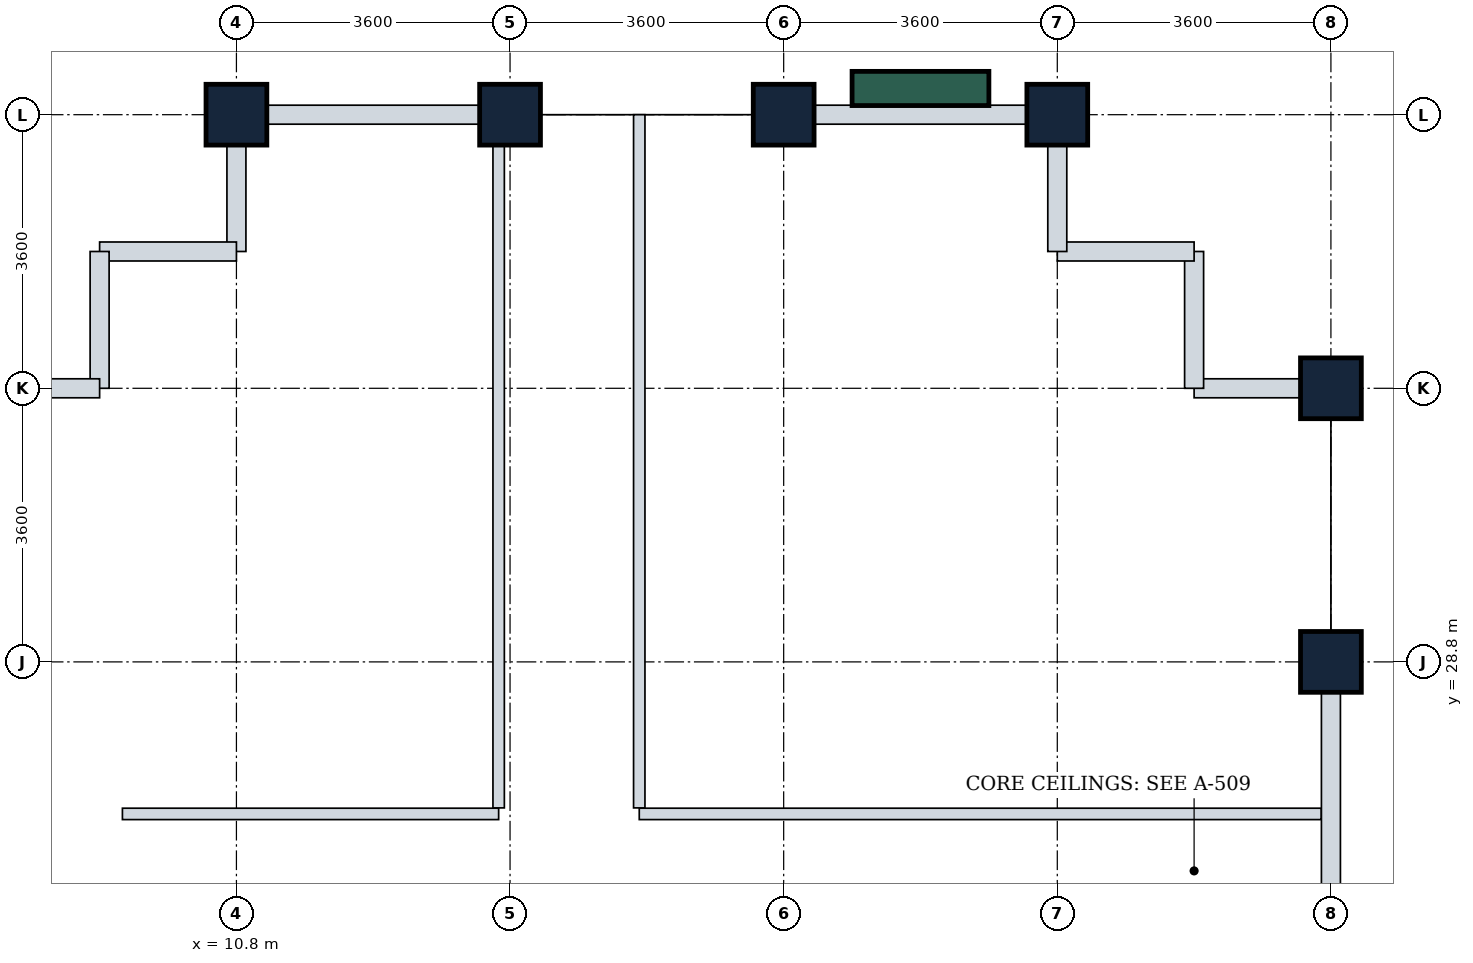
"""IFC4 building model, lengths in metres.
Left out: names, types, materials, properties, quantities, classifications, styles, units other than length and angle.
Written with IfcOpenShell. Run it as: python <this file> out.ifc"""

import sys

from ifc_helpers import new_model, si_unit, direction, frame, frame_2d, origin, origin_2d, place, context, subcontext, project, spatial, rectangle, extrude, element, fill, save


model = new_model("IFC4")
c1 = context("Model", 3, precision=1e-05, world=origin(), true_north=direction((0.0, 1.0)))
c2 = subcontext(c1, "Body", "Model", "MODEL_VIEW")
j1 = project(units=[si_unit("LENGTHUNIT", "METRE"), si_unit("PLANEANGLEUNIT", "RADIAN")], contexts=[c1])
p1 = place(None, origin())
s1 = spatial("IfcSite", under=j1, at=p1, CompositionType="ELEMENT")
p2 = place(p1, origin())
s2 = spatial("IfcBuilding", under=s1, at=p2, CompositionType="ELEMENT")
p3 = place(p2, frame((0.0, 0.0, 295.4)))
s3 = spatial("IfcBuildingStorey", under=s2, at=p3, CompositionType="ELEMENT", Elevation=295.4)
for number, where, z_axis, x_axis in (
    (1, (10.8, 36.0, 0.0), (0.0, 0.0, 1.0), (1.0, 0.0, 0.0)),
    (2, (14.4, 36.0, 0.0), (0.0, 0.0, 1.0), (1.0, 0.0, 0.0)),
    (3, (18.0, 36.0, 0.0), (0.0, 0.0, 1.0), (1.0, 0.0, 0.0)),
    (4, (21.6, 36.0, 0.0), (0.0, 0.0, 1.0), (1.0, 0.0, 0.0)),
    (5, (25.2, 28.8, 0.0), (0.0, 0.0, 1.0), (0.0, 1.0, 0.0)),
    (6, (25.2, 32.4, 0.0), (0.0, 0.0, 1.0), (0.0, 1.0, 0.0)),
):
    element("IfcColumn", number, at=place(p3, frame(where, z_axis=z_axis, x_axis=x_axis)), inside=s3, PredefinedType="COLUMN", context=c2, shape_type="SweptSolid", body=[
        extrude(rectangle(XDim=0.8, YDim=0.8, at=origin_2d()), origin(), (0.0, 0.0, 1.0), 4.4),
    ])
p4 = place(p3, frame((25.2, 28.8, 0.0), z_axis=(0.0, 0.0, 1.0), x_axis=(0.0, -1.0, 0.0)))
e7 = element("IfcWall", 7, at=p4, inside=s3, PredefinedType="STANDARD", context=c2, shape_type="SweptSolid", body=[
    extrude(rectangle(XDim=3.6, YDim=0.25, at=frame_2d((1.8, 0.0))), origin(), (0.0, 0.0, 1.0), 3.63),
])
p5 = place(p3, frame((23.4, 32.4, 0.0), z_axis=(0.0, 0.0, 1.0), x_axis=(1.0, 0.0, 0.0)))
e8 = element("IfcWall", 8, at=p5, inside=s3, PredefinedType="STANDARD", context=c2, shape_type="SweptSolid", body=[
    extrude(rectangle(XDim=1.8, YDim=0.25, at=frame_2d((0.9, 0.0))), origin(), (0.0, 0.0, 1.0), 3.63),
])
p6 = place(p3, frame((23.4, 32.4, 0.0), z_axis=(0.0, 0.0, 1.0), x_axis=(0.0, 1.0, 0.0)))
e9 = element("IfcWall", 9, at=p6, inside=s3, PredefinedType="STANDARD", context=c2, shape_type="SweptSolid", body=[
    extrude(rectangle(XDim=1.8, YDim=0.25, at=frame_2d((0.9, 0.0))), origin(), (0.0, 0.0, 1.0), 4.135),
])
p7 = place(p3, frame((21.6, 34.2, 0.0), z_axis=(0.0, 0.0, 1.0), x_axis=(1.0, 0.0, 0.0)))
e10 = element("IfcWall", 10, at=p7, inside=s3, PredefinedType="STANDARD", context=c2, shape_type="SweptSolid", body=[
    extrude(rectangle(XDim=1.8, YDim=0.25, at=frame_2d((0.9, 0.0))), origin(), (0.0, 0.0, 1.0), 4.135),
])
p8 = place(p3, frame((21.6, 34.2, 0.0), z_axis=(0.0, 0.0, 1.0), x_axis=(0.0, 1.0, 0.0)))
e11 = element("IfcWall", 11, at=p8, inside=s3, PredefinedType="STANDARD", context=c2, shape_type="SweptSolid", body=[
    extrude(rectangle(XDim=1.8, YDim=0.25, at=frame_2d((0.9, 0.0))), origin(), (0.0, 0.0, 1.0), 3.63),
])
p9 = place(p3, frame((18.0, 36.0, 0.0), z_axis=(0.0, 0.0, 1.0), x_axis=(1.0, 0.0, 0.0)))
e12 = element("IfcWall", 12, at=p9, inside=s3, PredefinedType="STANDARD", context=c2, shape_type="SweptSolid", body=[
    extrude(rectangle(XDim=3.6, YDim=0.25, at=frame_2d((1.8, 0.0))), origin(), (0.0, 0.0, 1.0), 3.63),
])
p10 = place(p9, frame((0.9, 0.0, 0.85)))
e13 = element("IfcOpeningElement", 13, at=p10, cuts=e12, PredefinedType="OPENING", context=c2, shape_type="SweptSolid", body=[
    extrude(rectangle(XDim=1.8, YDim=1.35, at=frame_2d((0.9, 0.675))), frame((0.0, 0.135, 0.0), z_axis=(0.0, -1.0, 0.0), x_axis=(1.0, 0.0, 0.0)), (0.0, 0.0, 1.0), 0.27),
])
p11 = place(p3, frame((10.8, 36.0, 0.0), z_axis=(0.0, 0.0, 1.0), x_axis=(1.0, 0.0, 0.0)))
e14 = element("IfcWall", 14, at=p11, inside=s3, PredefinedType="STANDARD", context=c2, shape_type="SweptSolid", body=[
    extrude(rectangle(XDim=3.6, YDim=0.25, at=frame_2d((1.8, 0.0))), origin(), (0.0, 0.0, 1.0), 3.63),
])
p12 = place(p3, frame((10.8, 34.2, 0.0), z_axis=(0.0, 0.0, 1.0), x_axis=(0.0, 1.0, 0.0)))
e15 = element("IfcWall", 15, at=p12, inside=s3, PredefinedType="STANDARD", context=c2, shape_type="SweptSolid", body=[
    extrude(rectangle(XDim=1.8, YDim=0.25, at=frame_2d((0.9, 0.0))), origin(), (0.0, 0.0, 1.0), 3.63),
])
for number, where, z_axis, x_axis in (
    (16, (9.0, 34.2, 0.0), (0.0, 0.0, 1.0), (1.0, 0.0, 0.0)),
    (17, (9.0, 32.4, 0.0), (0.0, 0.0, 1.0), (0.0, 1.0, 0.0)),
):
    element("IfcWall", number, at=place(p3, frame(where, z_axis=z_axis, x_axis=x_axis)), inside=s3, PredefinedType="STANDARD", context=c2, shape_type="SweptSolid", body=[
        extrude(rectangle(XDim=1.8, YDim=0.25, at=frame_2d((0.9, 0.0))), origin(), (0.0, 0.0, 1.0), 4.135),
    ])
p13 = place(p3, frame((7.2, 32.4, 0.0), z_axis=(0.0, 0.0, 1.0), x_axis=(1.0, 0.0, 0.0)))
e18 = element("IfcWall", 18, at=p13, inside=s3, PredefinedType="STANDARD", context=c2, shape_type="SweptSolid", body=[
    extrude(rectangle(XDim=1.8, YDim=0.25, at=frame_2d((0.9, 0.0))), origin(), (0.0, 0.0, 1.0), 3.63),
])
p14 = place(p3, frame((9.3, 26.8, 0.0), z_axis=(0.0, 0.0, 1.0), x_axis=(1.0, 0.0, 0.0)))
e19 = element("IfcWall", 19, at=p14, inside=s3, PredefinedType="PARTITIONING", context=c2, shape_type="SweptSolid", body=[
    extrude(rectangle(XDim=4.95, YDim=0.15, at=frame_2d((2.475, 0.0))), origin(), (0.0, 0.0, 1.0), 4.135),
])
p15 = place(p3, frame((14.25, 26.879, 0.0), z_axis=(0.0, 0.0, 1.0), x_axis=(0.0, 1.0, 0.0)))
e20 = element("IfcWall", 20, at=p15, inside=s3, PredefinedType="PARTITIONING", context=c2, shape_type="SweptSolid", body=[
    extrude(rectangle(XDim=8.992, YDim=0.15, at=frame_2d((4.496, 0.0))), origin(), (0.0, 0.0, 1.0), 3.63),
])
p16 = place(p15, frame((4.021, 0.0, 0.0)))
e21 = element("IfcOpeningElement", 21, at=p16, cuts=e20, PredefinedType="OPENING", context=c2, shape_type="SweptSolid", body=[
    extrude(rectangle(XDim=1.0, YDim=2.1, at=frame_2d((0.5, 1.05))), frame((0.0, 0.085, 0.0), z_axis=(0.0, -1.0, 0.0), x_axis=(1.0, 0.0, 0.0)), (0.0, 0.0, 1.0), 0.17),
])
p17 = place(p3, frame((16.1, 26.8, 0.0), z_axis=(0.0, 0.0, 1.0), x_axis=(1.0, 0.0, 0.0)))
e22 = element("IfcWall", 22, at=p17, inside=s3, PredefinedType="PARTITIONING", context=c2, shape_type="SweptSolid", body=[
    extrude(rectangle(XDim=8.971, YDim=0.15, at=frame_2d((4.485, 0.0))), origin(), (0.0, 0.0, 1.0), 3.63),
])
p18 = place(p3, frame((16.1, 26.879, 0.0), z_axis=(0.0, 0.0, 1.0), x_axis=(0.0, 1.0, 0.0)))
e23 = element("IfcWall", 23, at=p18, inside=s3, PredefinedType="PARTITIONING", context=c2, shape_type="SweptSolid", body=[
    extrude(rectangle(XDim=9.121, YDim=0.15, at=frame_2d((4.561, 0.0))), origin(), (0.0, 0.0, 1.0), 3.63),
])
p19 = place(p18, frame((4.021, 0.0, 0.0)))
e24 = element("IfcOpeningElement", 24, at=p19, cuts=e23, PredefinedType="OPENING", context=c2, shape_type="SweptSolid", body=[
    extrude(rectangle(XDim=1.0, YDim=2.1, at=frame_2d((0.5, 1.05))), frame((0.0, 0.085, 0.0), z_axis=(0.0, -1.0, 0.0), x_axis=(1.0, 0.0, 0.0)), (0.0, 0.0, 1.0), 0.17),
])
p20 = place(p10, origin())
e25 = element("IfcWindow", 25, at=p20, inside=s3, PartitioningType="SINGLE_PANEL", PredefinedType="WINDOW", context=c2, shape_type="SweptSolid", body=[
    extrude(rectangle(XDim=1.8, YDim=1.35, at=frame_2d((0.9, 0.675))), frame((0.0, 0.03, 0.0), z_axis=(0.0, -1.0, 0.0), x_axis=(1.0, 0.0, 0.0)), (0.0, 0.0, 1.0), 0.06),
])
fill(e13, e25)
p21 = place(p16, origin())
e26 = element("IfcDoor", 26, at=p21, inside=s3, OperationType="SINGLE_SWING_RIGHT", PredefinedType="DOOR", context=c2, shape_type="SweptSolid", body=[
    extrude(rectangle(XDim=1.0, YDim=2.1, at=frame_2d((0.5, 1.05))), frame((0.0, 0.025, 0.0), z_axis=(0.0, -1.0, 0.0), x_axis=(1.0, 0.0, 0.0)), (0.0, 0.0, 1.0), 0.05),
])
fill(e21, e26)
p22 = place(p19, origin())
e27 = element("IfcDoor", 27, at=p22, inside=s3, OperationType="SINGLE_SWING_LEFT", PredefinedType="DOOR", context=c2, shape_type="SweptSolid", body=[
    extrude(rectangle(XDim=1.0, YDim=2.1, at=frame_2d((0.5, 1.05))), frame((0.0, 0.025, 0.0), z_axis=(0.0, -1.0, 0.0), x_axis=(1.0, 0.0, 0.0)), (0.0, 0.0, 1.0), 0.05),
])
fill(e24, e27)
save(model, sys.argv[1])
